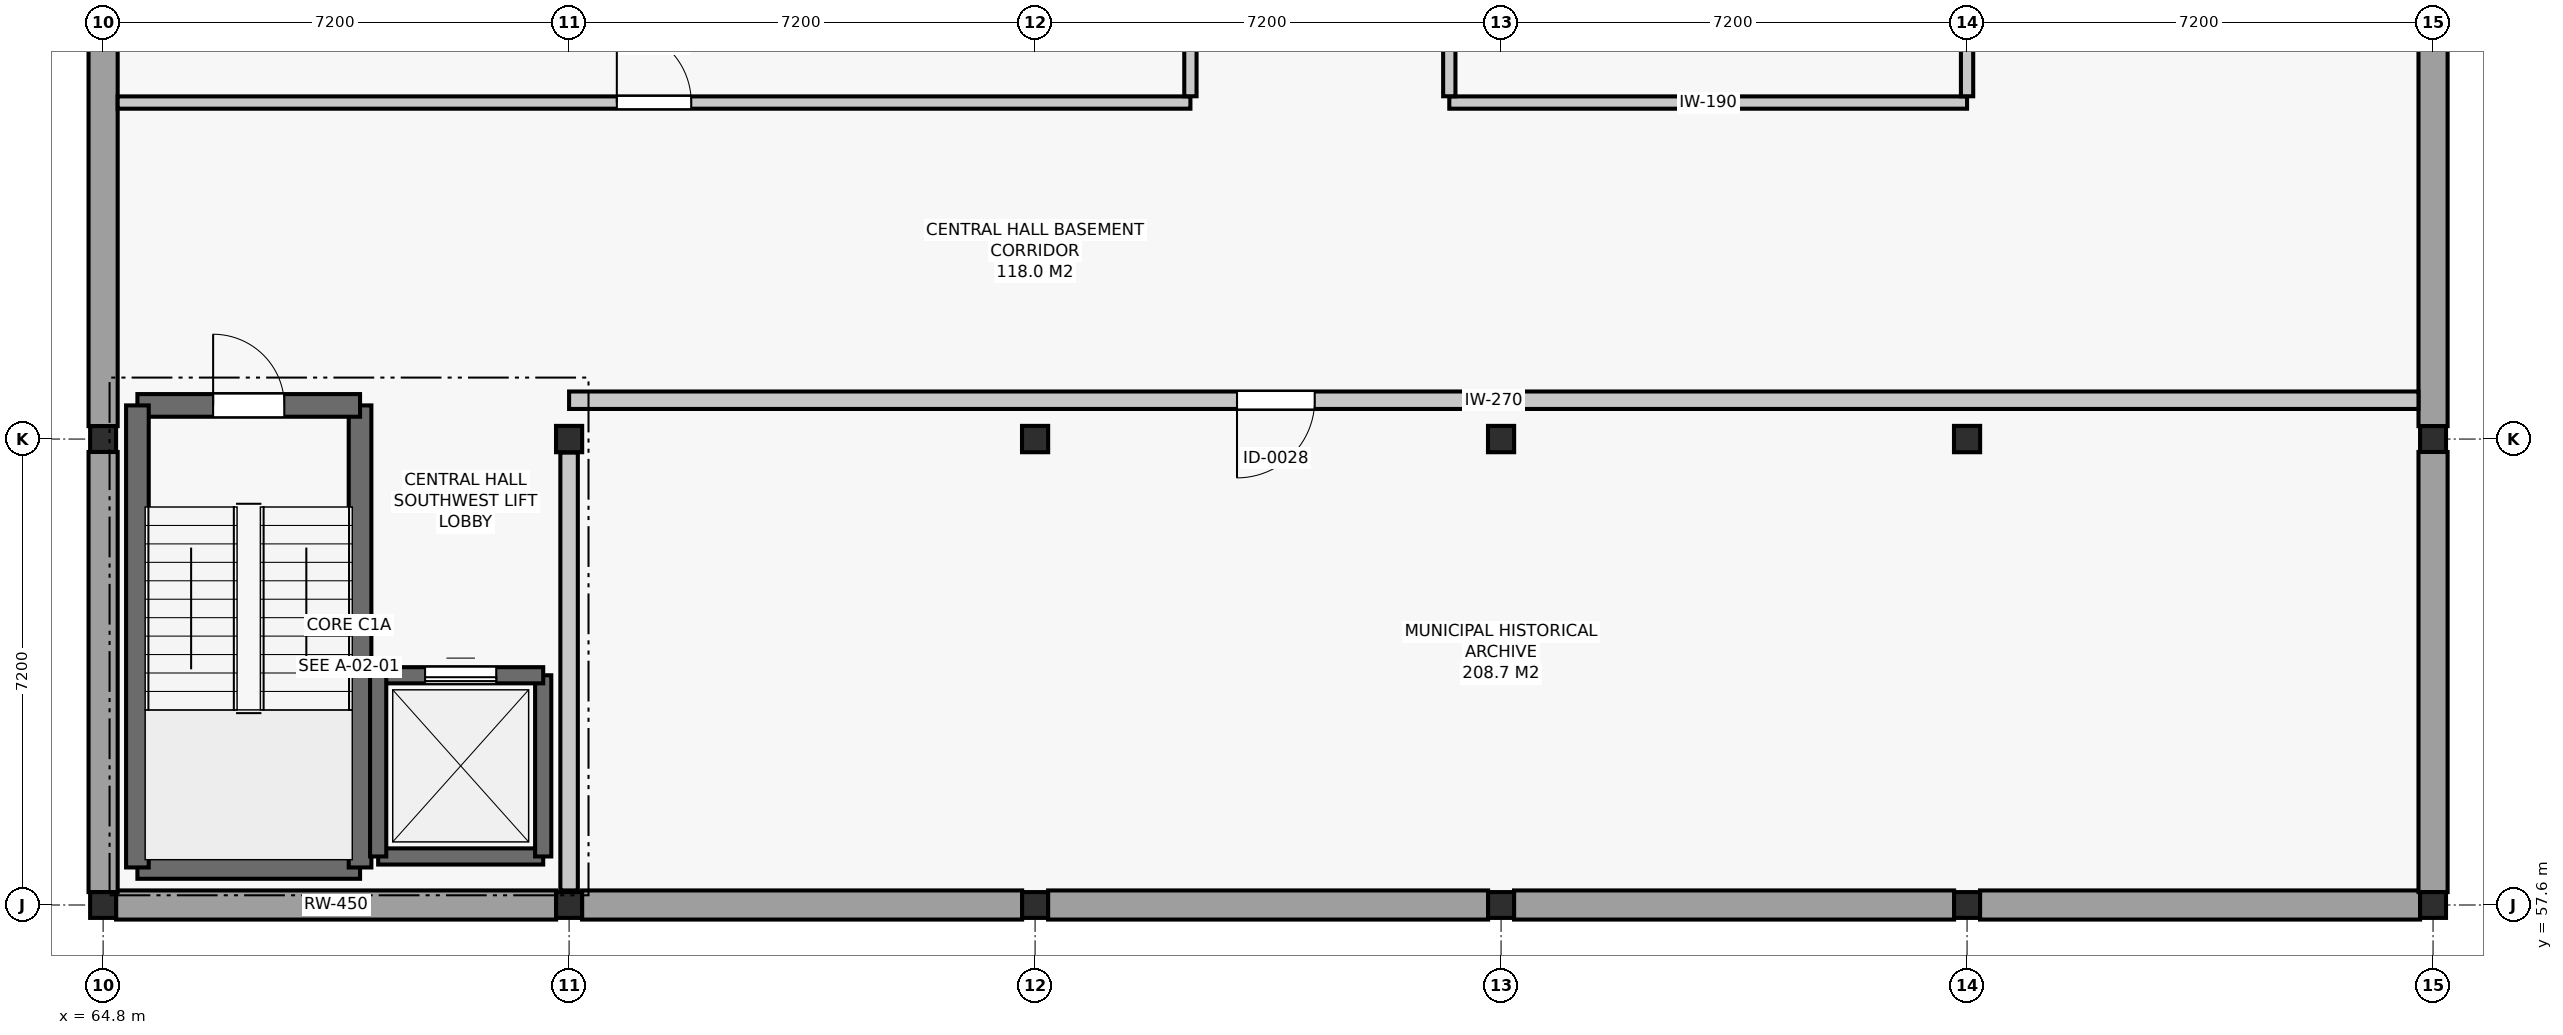
"""IFC4 building model, lengths in metres.
Left out: names, types, materials, properties, quantities, classifications, styles, units other than length and angle.
Written with IfcOpenShell. Run it as: python <this file> out.ifc"""

import sys

from ifc_helpers import new_model, si_unit, direction, frame, frame_2d, origin, origin_2d, place, context, subcontext, project, spatial, rectangle, i_section, extrude, element, fill, save


model = new_model("IFC4")
c1 = context("Model", 3, precision=1e-05, world=origin(), true_north=direction((0.0, 1.0)))
c2 = subcontext(c1, "Body", "Model", "MODEL_VIEW")
j1 = project(units=[si_unit("LENGTHUNIT", "METRE"), si_unit("PLANEANGLEUNIT", "RADIAN")], contexts=[c1])
p1 = place(None, origin())
s1 = spatial("IfcSite", under=j1, at=p1, CompositionType="ELEMENT")
p2 = place(p1, origin())
s2 = spatial("IfcBuilding", under=s1, at=p2, CompositionType="ELEMENT")
p3 = place(p2, frame((0.0, 0.0, -4.2)))
s3 = spatial("IfcBuildingStorey", under=s2, at=p3, CompositionType="ELEMENT", Elevation=-4.2)
for number, where, z_axis, x_axis in (
    (1, (64.8, 57.6, 0.0), (0.0, 0.0, 1.0), (1.0, 0.0, 0.0)),
    (2, (64.8, 64.8, 0.0), (0.0, 0.0, 1.0), (1.0, 0.0, 0.0)),
    (3, (72.0, 57.6, 0.0), (0.0, 0.0, 1.0), (1.0, 0.0, 0.0)),
):
    element("IfcColumn", number, at=place(p3, frame(where, z_axis=z_axis, x_axis=x_axis)), inside=s3, PredefinedType="COLUMN", context=c2, shape_type="SweptSolid", body=[
        extrude(i_section(OverallWidth=0.401, OverallDepth=0.399, WebThickness=0.019, FlangeThickness=0.029, FilletRadius=0.015, at=origin_2d()), origin(), (0.0, 0.0, 1.0), 4.2),
    ])
p4 = place(p3, frame((72.0, 64.8, 0.0), z_axis=(0.0, 0.0, 1.0), x_axis=(1.0, 0.0, 0.0)))
e4 = element("IfcColumn", 4, at=p4, inside=s3, PredefinedType="COLUMN", context=c2, shape_type="SweptSolid", body=[
    extrude(i_section(OverallWidth=0.404, OverallDepth=0.407, WebThickness=0.02, FlangeThickness=0.032, FilletRadius=0.015, at=origin_2d()), origin(), (0.0, 0.0, 1.0), 4.2),
])
p5 = place(p3, frame((79.2, 57.6, 0.0), z_axis=(0.0, 0.0, 1.0), x_axis=(1.0, 0.0, 0.0)))
e5 = element("IfcColumn", 5, at=p5, inside=s3, PredefinedType="COLUMN", context=c2, shape_type="SweptSolid", body=[
    extrude(i_section(OverallWidth=0.401, OverallDepth=0.399, WebThickness=0.019, FlangeThickness=0.029, FilletRadius=0.015, at=origin_2d()), origin(), (0.0, 0.0, 1.0), 4.2),
])
p6 = place(p3, frame((79.2, 64.8, 0.0), z_axis=(0.0, 0.0, 1.0), x_axis=(1.0, 0.0, 0.0)))
e6 = element("IfcColumn", 6, at=p6, inside=s3, PredefinedType="COLUMN", context=c2, shape_type="SweptSolid", body=[
    extrude(i_section(OverallWidth=0.404, OverallDepth=0.407, WebThickness=0.02, FlangeThickness=0.032, FilletRadius=0.015, at=origin_2d()), origin(), (0.0, 0.0, 1.0), 4.2),
])
p7 = place(p3, frame((86.4, 57.6, 0.0), z_axis=(0.0, 0.0, 1.0), x_axis=(1.0, 0.0, 0.0)))
e7 = element("IfcColumn", 7, at=p7, inside=s3, PredefinedType="COLUMN", context=c2, shape_type="SweptSolid", body=[
    extrude(i_section(OverallWidth=0.401, OverallDepth=0.399, WebThickness=0.019, FlangeThickness=0.029, FilletRadius=0.015, at=origin_2d()), origin(), (0.0, 0.0, 1.0), 4.2),
])
p8 = place(p3, frame((86.4, 64.8, 0.0), z_axis=(0.0, 0.0, 1.0), x_axis=(1.0, 0.0, 0.0)))
e8 = element("IfcColumn", 8, at=p8, inside=s3, PredefinedType="COLUMN", context=c2, shape_type="SweptSolid", body=[
    extrude(i_section(OverallWidth=0.404, OverallDepth=0.407, WebThickness=0.02, FlangeThickness=0.032, FilletRadius=0.015, at=origin_2d()), origin(), (0.0, 0.0, 1.0), 4.2),
])
p9 = place(p3, frame((93.6, 57.6, 0.0), z_axis=(0.0, 0.0, 1.0), x_axis=(1.0, 0.0, 0.0)))
e9 = element("IfcColumn", 9, at=p9, inside=s3, PredefinedType="COLUMN", context=c2, shape_type="SweptSolid", body=[
    extrude(i_section(OverallWidth=0.401, OverallDepth=0.399, WebThickness=0.019, FlangeThickness=0.029, FilletRadius=0.015, at=origin_2d()), origin(), (0.0, 0.0, 1.0), 4.2),
])
p10 = place(p3, frame((93.6, 64.8, 0.0), z_axis=(0.0, 0.0, 1.0), x_axis=(1.0, 0.0, 0.0)))
e10 = element("IfcColumn", 10, at=p10, inside=s3, PredefinedType="COLUMN", context=c2, shape_type="SweptSolid", body=[
    extrude(i_section(OverallWidth=0.404, OverallDepth=0.407, WebThickness=0.02, FlangeThickness=0.032, FilletRadius=0.015, at=origin_2d()), origin(), (0.0, 0.0, 1.0), 4.2),
])
for number, where, z_axis, x_axis in (
    (11, (100.8, 57.6, 0.0), (0.0, 0.0, 1.0), (1.0, 0.0, 0.0)),
    (12, (100.8, 64.8, 0.0), (0.0, 0.0, 1.0), (1.0, 0.0, 0.0)),
):
    element("IfcColumn", number, at=place(p3, frame(where, z_axis=z_axis, x_axis=x_axis)), inside=s3, PredefinedType="COLUMN", context=c2, shape_type="SweptSolid", body=[
        extrude(i_section(OverallWidth=0.401, OverallDepth=0.399, WebThickness=0.019, FlangeThickness=0.029, FilletRadius=0.015, at=origin_2d()), origin(), (0.0, 0.0, 1.0), 4.2),
    ])
for number, where, z_axis, x_axis in (
    (13, (65.0, 57.6, 0.0), (0.0, 0.0, 1.0), (1.0, 0.0, 0.0)),
    (14, (72.2, 57.6, 0.0), (0.0, 0.0, 1.0), (1.0, 0.0, 0.0)),
    (15, (79.4, 57.6, 0.0), (0.0, 0.0, 1.0), (1.0, 0.0, 0.0)),
):
    element("IfcWall", number, at=place(p3, frame(where, z_axis=z_axis, x_axis=x_axis)), inside=s3, PredefinedType="USERDEFINED", context=c2, shape_type="SweptSolid", body=[
        extrude(rectangle(XDim=6.799, YDim=0.45, at=frame_2d((3.399, 0.0))), origin(), (0.0, 0.0, 1.0), 3.26),
    ])
p11 = place(p3, frame((86.601, 57.6, 0.0), z_axis=(0.0, 0.0, 1.0), x_axis=(1.0, 0.0, 0.0)))
e16 = element("IfcWall", 16, at=p11, inside=s3, PredefinedType="USERDEFINED", context=c2, shape_type="SweptSolid", body=[
    extrude(rectangle(XDim=6.799, YDim=0.45, at=frame_2d((3.399, 0.0))), origin(), (0.0, 0.0, 1.0), 3.26),
])
p12 = place(p3, frame((93.801, 57.6, 0.0), z_axis=(0.0, 0.0, 1.0), x_axis=(1.0, 0.0, 0.0)))
e17 = element("IfcWall", 17, at=p12, inside=s3, PredefinedType="USERDEFINED", context=c2, shape_type="SweptSolid", body=[
    extrude(rectangle(XDim=6.799, YDim=0.45, at=frame_2d((3.399, 0.0))), origin(), (0.0, 0.0, 1.0), 3.26),
])
for number, where, z_axis, x_axis in (
    (18, (64.8, 57.8, 0.0), (0.0, 0.0, 1.0), (0.0, 1.0, 0.0)),
    (19, (100.8, 57.8, 0.0), (0.0, 0.0, 1.0), (0.0, 1.0, 0.0)),
    (20, (64.8, 65.0, 0.0), (0.0, 0.0, 1.0), (0.0, 1.0, 0.0)),
    (21, (100.8, 65.0, 0.0), (0.0, 0.0, 1.0), (0.0, 1.0, 0.0)),
):
    element("IfcWall", number, at=place(p3, frame(where, z_axis=z_axis, x_axis=x_axis)), inside=s3, PredefinedType="USERDEFINED", context=c2, shape_type="SweptSolid", body=[
        extrude(rectangle(XDim=6.801, YDim=0.45, at=frame_2d((3.4, 0.0))), origin(), (0.0, 0.0, 1.0), 3.26),
    ])
p13 = place(p3, frame((65.33, 58.18, 0.0), z_axis=(0.0, 0.0, 1.0), x_axis=(1.0, 0.0, 0.0)))
e22 = element("IfcWall", 22, at=p13, inside=s3, PredefinedType="SHEAR", context=c2, shape_type="SweptSolid", body=[
    extrude(rectangle(XDim=3.44, YDim=0.35, at=frame_2d((1.72, 0.0))), origin(), (0.0, 0.0, 1.0), 3.88),
])
p14 = place(p3, frame((68.77, 58.18, 0.0), z_axis=(0.0, 0.0, 1.0), x_axis=(0.0, 1.0, 0.0)))
e23 = element("IfcWall", 23, at=p14, inside=s3, PredefinedType="SHEAR", context=c2, shape_type="SweptSolid", body=[
    extrude(rectangle(XDim=7.14, YDim=0.35, at=frame_2d((3.57, 0.0))), origin(), (0.0, 0.0, 1.0), 3.88),
])
p15 = place(p3, frame((68.77, 65.32, 0.0), z_axis=(0.0, 0.0, 1.0), x_axis=(-1.0, 0.0, 0.0)))
e24 = element("IfcWall", 24, at=p15, inside=s3, PredefinedType="SHEAR", context=c2, shape_type="SweptSolid", body=[
    extrude(rectangle(XDim=3.44, YDim=0.35, at=frame_2d((1.72, 0.0))), origin(), (0.0, 0.0, 1.0), 3.88),
])
p16 = place(p15, frame((1.17, 0.0, 0.0)))
e25 = element("IfcOpeningElement", 25, at=p16, cuts=e24, PredefinedType="OPENING", context=c2, shape_type="SweptSolid", body=[
    extrude(rectangle(XDim=1.1, YDim=2.15, at=frame_2d((0.55, 1.075))), frame((0.0, 0.187, 0.0), z_axis=(0.0, -1.0, 0.0), x_axis=(1.0, 0.0, 0.0)), (0.0, 0.0, 1.0), 0.374),
])
p17 = place(p3, frame((65.33, 65.32, 0.0), z_axis=(0.0, 0.0, 1.0), x_axis=(0.0, -1.0, 0.0)))
e26 = element("IfcWall", 26, at=p17, inside=s3, PredefinedType="SHEAR", context=c2, shape_type="SweptSolid", body=[
    extrude(rectangle(XDim=7.14, YDim=0.35, at=frame_2d((3.57, 0.0))), origin(), (0.0, 0.0, 1.0), 3.88),
])
p18 = place(p3, frame((69.05, 58.35, 0.0), z_axis=(0.0, 0.0, 1.0), x_axis=(1.0, 0.0, 0.0)))
e27 = element("IfcWall", 27, at=p18, inside=s3, PredefinedType="SHEAR", context=c2, shape_type="SweptSolid", body=[
    extrude(rectangle(XDim=2.55, YDim=0.25, at=frame_2d((1.275, 0.0))), origin(), (0.0, 0.0, 1.0), 3.88),
])
p19 = place(p3, frame((71.6, 58.35, 0.0), z_axis=(0.0, 0.0, 1.0), x_axis=(0.0, 1.0, 0.0)))
e28 = element("IfcWall", 28, at=p19, inside=s3, PredefinedType="SHEAR", context=c2, shape_type="SweptSolid", body=[
    extrude(rectangle(XDim=2.8, YDim=0.25, at=frame_2d((1.4, 0.0))), origin(), (0.0, 0.0, 1.0), 3.88),
])
p20 = place(p3, frame((71.6, 61.15, 0.0), z_axis=(0.0, 0.0, 1.0), x_axis=(-1.0, 0.0, 0.0)))
e29 = element("IfcWall", 29, at=p20, inside=s3, PredefinedType="SHEAR", context=c2, shape_type="SweptSolid", body=[
    extrude(rectangle(XDim=2.55, YDim=0.25, at=frame_2d((1.275, 0.0))), origin(), (0.0, 0.0, 1.0), 3.88),
])
p21 = place(p20, frame((0.725, 0.0, 0.0)))
e30 = element("IfcOpeningElement", 30, at=p21, cuts=e29, PredefinedType="OPENING", context=c2, shape_type="SweptSolid", body=[
    extrude(rectangle(XDim=1.1, YDim=2.1, at=frame_2d((0.55, 1.05))), frame((0.0, 0.137, 0.0), z_axis=(0.0, -1.0, 0.0), x_axis=(1.0, 0.0, 0.0)), (0.0, 0.0, 1.0), 0.274),
])
p22 = place(p3, frame((69.05, 61.15, 0.0), z_axis=(0.0, 0.0, 1.0), x_axis=(0.0, -1.0, 0.0)))
e31 = element("IfcWall", 31, at=p22, inside=s3, PredefinedType="SHEAR", context=c2, shape_type="SweptSolid", body=[
    extrude(rectangle(XDim=2.8, YDim=0.25, at=frame_2d((1.4, 0.0))), origin(), (0.0, 0.0, 1.0), 3.88),
])
p23 = place(p3, frame((72.0, 65.4, 0.0), z_axis=(0.0, 0.0, 1.0), x_axis=(1.0, 0.0, 0.0)))
e32 = element("IfcWall", 32, at=p23, inside=s3, PredefinedType="SOLIDWALL", context=c2, shape_type="SweptSolid", body=[
    extrude(rectangle(XDim=28.575, YDim=0.27, at=frame_2d((14.288, 0.0))), origin(), (0.0, 0.0, 1.0), 3.409),
])
p24 = place(p23, frame((10.32, 0.0, 0.0)))
e33 = element("IfcOpeningElement", 33, at=p24, cuts=e32, PredefinedType="OPENING", context=c2, shape_type="SweptSolid", body=[
    extrude(rectangle(XDim=1.2, YDim=2.2, at=frame_2d((0.6, 1.1))), frame((0.0, 0.147, 0.0), z_axis=(0.0, -1.0, 0.0), x_axis=(1.0, 0.0, 0.0)), (0.0, 0.0, 1.0), 0.294),
])
p25 = place(p3, frame((65.025, 70.0, 0.0), z_axis=(0.0, 0.0, 1.0), x_axis=(1.0, 0.0, 0.0)))
e34 = element("IfcWall", 34, at=p25, inside=s3, PredefinedType="PARTITIONING", context=c2, shape_type="SweptSolid", body=[
    extrude(rectangle(XDim=16.575, YDim=0.19, at=frame_2d((8.288, 0.0))), origin(), (0.0, 0.0, 1.0), 3.409),
])
p26 = place(p25, frame((7.712, 0.0, 0.0)))
e35 = element("IfcOpeningElement", 35, at=p26, cuts=e34, PredefinedType="OPENING", context=c2, shape_type="SweptSolid", body=[
    extrude(rectangle(XDim=1.15, YDim=2.2, at=frame_2d((0.575, 1.1))), frame((0.0, 0.107, 0.0), z_axis=(0.0, -1.0, 0.0), x_axis=(1.0, 0.0, 0.0)), (0.0, 0.0, 1.0), 0.214),
])
p27 = place(p3, frame((85.6, 70.0, 0.0), z_axis=(0.0, 0.0, 1.0), x_axis=(1.0, 0.0, 0.0)))
e36 = element("IfcWall", 36, at=p27, inside=s3, PredefinedType="PARTITIONING", context=c2, shape_type="SweptSolid", body=[
    extrude(rectangle(XDim=8.0, YDim=0.19, at=frame_2d((4.0, 0.0))), origin(), (0.0, 0.0, 1.0), 3.409),
])
p28 = place(p3, frame((72.0, 57.825, 0.0), z_axis=(0.0, 0.0, 1.0), x_axis=(0.0, 1.0, 0.0)))
e37 = element("IfcWall", 37, at=p28, inside=s3, PredefinedType="SOLIDWALL", context=c2, shape_type="SweptSolid", body=[
    extrude(rectangle(XDim=6.768, YDim=0.27, at=frame_2d((3.384, 0.0))), origin(), (0.0, 0.0, 1.0), 3.425),
])
p29 = place(p3, frame((81.6, 70.097, 0.0), z_axis=(0.0, 0.0, 1.0), x_axis=(0.0, 1.0, 0.0)))
e38 = element("IfcWall", 38, at=p29, inside=s3, PredefinedType="PARTITIONING", context=c2, shape_type="SweptSolid", body=[
    extrude(rectangle(XDim=15.606, YDim=0.19, at=frame_2d((7.803, 0.0))), origin(), (0.0, 0.0, 1.0), 3.365),
])
p30 = place(p3, frame((85.6, 70.097, 0.0), z_axis=(0.0, 0.0, 1.0), x_axis=(0.0, 1.0, 0.0)))
e39 = element("IfcWall", 39, at=p30, inside=s3, PredefinedType="PARTITIONING", context=c2, shape_type="SweptSolid", body=[
    extrude(rectangle(XDim=15.576, YDim=0.19, at=frame_2d((7.788, 0.0))), origin(), (0.0, 0.0, 1.0), 3.365),
])
p31 = place(p30, frame((7.213, 0.0, 0.0)))
e40 = element("IfcOpeningElement", 40, at=p31, cuts=e39, PredefinedType="OPENING", context=c2, shape_type="SweptSolid", body=[
    extrude(rectangle(XDim=1.15, YDim=2.2, at=frame_2d((0.575, 1.1))), frame((0.0, 0.107, 0.0), z_axis=(0.0, -1.0, 0.0), x_axis=(1.0, 0.0, 0.0)), (0.0, 0.0, 1.0), 0.214),
])
p32 = place(p3, frame((93.6, 70.097, 0.0), z_axis=(0.0, 0.0, 1.0), x_axis=(0.0, 1.0, 0.0)))
e41 = element("IfcWall", 41, at=p32, inside=s3, PredefinedType="PARTITIONING", context=c2, shape_type="SweptSolid", body=[
    extrude(rectangle(XDim=1.696, YDim=0.19, at=frame_2d((0.848, 0.0))), origin(), (0.0, 0.0, 1.0), 3.425),
])
p33 = place(p16, frame((1.1, 0.0, 0.0), z_axis=(0.0, 0.0, 1.0), x_axis=(-1.0, 0.0, 0.0)))
e42 = element("IfcDoor", 42, at=p33, inside=s3, OperationType="SINGLE_SWING_LEFT", PredefinedType="DOOR", context=c2, shape_type="SweptSolid", body=[
    extrude(rectangle(XDim=1.1, YDim=2.15, at=frame_2d((0.55, 1.075))), frame((0.0, 0.025, 0.0), z_axis=(0.0, -1.0, 0.0), x_axis=(1.0, 0.0, 0.0)), (0.0, 0.0, 1.0), 0.05),
])
fill(e25, e42)
p34 = place(p21, origin())
e43 = element("IfcDoor", 43, at=p34, inside=s3, OperationType="SLIDING_TO_LEFT", PredefinedType="DOOR", context=c2, shape_type="SweptSolid", body=[
    extrude(rectangle(XDim=1.1, YDim=2.1, at=frame_2d((0.55, 1.05))), frame((0.0, 0.025, 0.0), z_axis=(0.0, -1.0, 0.0), x_axis=(1.0, 0.0, 0.0)), (0.0, 0.0, 1.0), 0.05),
])
fill(e30, e43)
p35 = place(p24, frame((1.2, 0.0, 0.0), z_axis=(0.0, 0.0, 1.0), x_axis=(-1.0, 0.0, 0.0)))
e44 = element("IfcDoor", 44, at=p35, inside=s3, OperationType="SINGLE_SWING_RIGHT", PredefinedType="DOOR", context=c2, shape_type="SweptSolid", body=[
    extrude(rectangle(XDim=1.2, YDim=2.2, at=frame_2d((0.6, 1.1))), frame((0.0, 0.025, 0.0), z_axis=(0.0, -1.0, 0.0), x_axis=(1.0, 0.0, 0.0)), (0.0, 0.0, 1.0), 0.05),
])
fill(e33, e44)
p36 = place(p26, origin())
e45 = element("IfcDoor", 45, at=p36, inside=s3, OperationType="SINGLE_SWING_LEFT", PredefinedType="DOOR", context=c2, shape_type="SweptSolid", body=[
    extrude(rectangle(XDim=1.15, YDim=2.2, at=frame_2d((0.575, 1.1))), frame((0.0, 0.025, 0.0), z_axis=(0.0, -1.0, 0.0), x_axis=(1.0, 0.0, 0.0)), (0.0, 0.0, 1.0), 0.05),
])
fill(e35, e45)
save(model, sys.argv[1])
